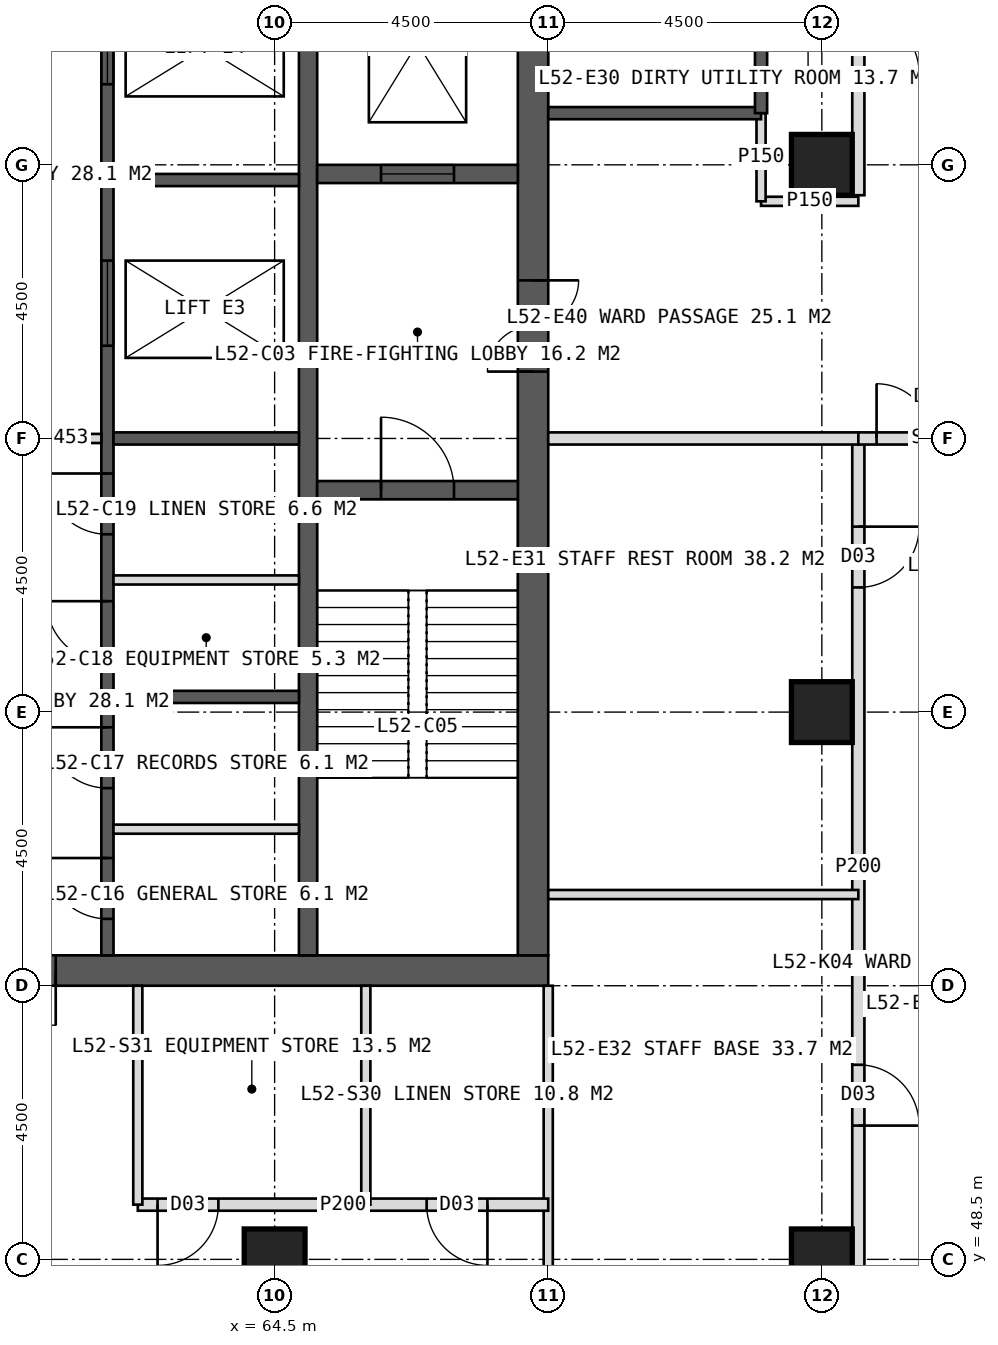
"""IFC4 building model, lengths in metres.
Left out: names, types, materials, properties, quantities, classifications, styles, units other than length and angle.
Written with IfcOpenShell. Run it as: python <this file> out.ifc"""

import sys

from ifc_helpers import new_model, si_unit, direction, frame, frame_2d, origin, origin_2d, place, context, subcontext, project, spatial, rectangle, hollow_rectangle, extrude, element, fill, save


model = new_model("IFC4")
c1 = context("Model", 3, precision=1e-05, world=origin(), true_north=direction((0.0, 1.0)))
c2 = subcontext(c1, "Body", "Model", "MODEL_VIEW")
j1 = project(units=[si_unit("LENGTHUNIT", "METRE"), si_unit("PLANEANGLEUNIT", "RADIAN")], contexts=[c1])
p1 = place(None, origin())
s1 = spatial("IfcSite", under=j1, at=p1, CompositionType="ELEMENT")
p2 = place(p1, origin())
s2 = spatial("IfcBuilding", under=s1, at=p2, CompositionType="ELEMENT")
p3 = place(p2, frame((0.0, 0.0, 217.0)))
s3 = spatial("IfcBuildingStorey", under=s2, at=p3, CompositionType="ELEMENT", Elevation=217.0)
p4 = place(p3, frame((51.0, 53.25, 0.0), z_axis=(0.0, 0.0, 1.0), x_axis=(1.0, 0.0, 0.0)))
e1 = element("IfcWall", 1, at=p4, inside=s3, PredefinedType="SHEAR", context=c2, shape_type="SweptSolid", body=[
    extrude(rectangle(XDim=18.0, YDim=0.5, at=frame_2d((9.0, 0.0))), origin(), (0.0, 0.0, 1.0), 4.0),
])
p5 = place(p4, frame((8.1, 0.0, 0.0)))
e2 = element("IfcOpeningElement", 2, at=p5, cuts=e1, PredefinedType="OPENING", context=c2, shape_type="SweptSolid", body=[
    extrude(rectangle(XDim=1.8, YDim=2.2, at=frame_2d((0.9, 1.1))), frame((0.0, 0.26, 0.0), z_axis=(0.0, -1.0, 0.0), x_axis=(1.0, 0.0, 0.0)), (0.0, 0.0, 1.0), 0.52),
])
p6 = place(p3, frame((68.75, 53.5, 0.0), z_axis=(0.0, 0.0, 1.0), x_axis=(0.0, 1.0, 0.0)))
e3 = element("IfcWall", 3, at=p6, inside=s3, PredefinedType="SHEAR", context=c2, shape_type="SweptSolid", body=[
    extrude(rectangle(XDim=17.0, YDim=0.5, at=frame_2d((8.5, 0.0))), origin(), (0.0, 0.0, 1.0), 4.0),
])
p7 = place(p6, frame((9.6, 0.0, 0.0)))
e4 = element("IfcOpeningElement", 4, at=p7, cuts=e3, PredefinedType="OPENING", context=c2, shape_type="SweptSolid", body=[
    extrude(rectangle(XDim=1.5, YDim=2.2, at=frame_2d((0.75, 1.1))), frame((0.0, 0.26, 0.0), z_axis=(0.0, -1.0, 0.0), x_axis=(1.0, 0.0, 0.0)), (0.0, 0.0, 1.0), 0.52),
])
p8 = place(p3, frame((65.05, 53.5, 0.0), z_axis=(0.0, 0.0, 1.0), x_axis=(0.0, 1.0, 0.0)))
e5 = element("IfcWall", 5, at=p8, inside=s3, PredefinedType="SHEAR", context=c2, shape_type="SweptSolid", body=[
    extrude(rectangle(XDim=17.0, YDim=0.3, at=frame_2d((8.5, 0.0))), origin(), (0.0, 0.0, 1.0), 4.0),
])
p9 = place(p3, frame((61.75, 53.5, 0.0), z_axis=(0.0, 0.0, 1.0), x_axis=(0.0, 1.0, 0.0)))
e6 = element("IfcWall", 6, at=p9, inside=s3, PredefinedType="SHEAR", context=c2, shape_type="SweptSolid", body=[
    extrude(rectangle(XDim=17.0, YDim=0.2, at=frame_2d((8.5, 0.0))), origin(), (0.0, 0.0, 1.0), 4.0),
])
p10 = place(p9, frame((0.6, 0.0, 0.0)))
e7 = element("IfcOpeningElement", 7, at=p10, cuts=e6, PredefinedType="OPENING", context=c2, shape_type="SweptSolid", body=[
    extrude(rectangle(XDim=1.0, YDim=2.1, at=frame_2d((0.5, 1.05))), frame((0.0, 0.11, 0.0), z_axis=(0.0, -1.0, 0.0), x_axis=(1.0, 0.0, 0.0)), (0.0, 0.0, 1.0), 0.22),
])
p11 = place(p9, frame((2.75, 0.0, 0.0)))
e8 = element("IfcOpeningElement", 8, at=p11, cuts=e6, PredefinedType="OPENING", context=c2, shape_type="SweptSolid", body=[
    extrude(rectangle(XDim=1.0, YDim=2.1, at=frame_2d((0.5, 1.05))), frame((0.0, 0.11, 0.0), z_axis=(0.0, -1.0, 0.0), x_axis=(1.0, 0.0, 0.0)), (0.0, 0.0, 1.0), 0.22),
])
p12 = place(p9, frame((4.824, 0.0, 0.0)))
e9 = element("IfcOpeningElement", 9, at=p12, cuts=e6, PredefinedType="OPENING", context=c2, shape_type="SweptSolid", body=[
    extrude(rectangle(XDim=1.0, YDim=2.1, at=frame_2d((0.5, 1.05))), frame((0.0, 0.11, 0.0), z_axis=(0.0, -1.0, 0.0), x_axis=(1.0, 0.0, 0.0)), (0.0, 0.0, 1.0), 0.22),
])
p13 = place(p9, frame((6.924, 0.0, 0.0)))
e10 = element("IfcOpeningElement", 10, at=p13, cuts=e6, PredefinedType="OPENING", context=c2, shape_type="SweptSolid", body=[
    extrude(rectangle(XDim=1.0, YDim=2.1, at=frame_2d((0.5, 1.05))), frame((0.0, 0.11, 0.0), z_axis=(0.0, -1.0, 0.0), x_axis=(1.0, 0.0, 0.0)), (0.0, 0.0, 1.0), 0.22),
])
p14 = place(p9, frame((10.025, 0.0, 0.0)))
e11 = element("IfcOpeningElement", 11, at=p14, cuts=e6, PredefinedType="OPENING", context=c2, shape_type="SweptSolid", body=[
    extrude(rectangle(XDim=1.4, YDim=2.2, at=frame_2d((0.7, 1.1))), frame((0.0, 0.11, 0.0), z_axis=(0.0, -1.0, 0.0), x_axis=(1.0, 0.0, 0.0)), (0.0, 0.0, 1.0), 0.22),
])
p15 = place(p9, frame((14.325, 0.0, 0.0)))
e12 = element("IfcOpeningElement", 12, at=p15, cuts=e6, PredefinedType="OPENING", context=c2, shape_type="SweptSolid", body=[
    extrude(rectangle(XDim=1.4, YDim=2.2, at=frame_2d((0.7, 1.1))), frame((0.0, 0.11, 0.0), z_axis=(0.0, -1.0, 0.0), x_axis=(1.0, 0.0, 0.0)), (0.0, 0.0, 1.0), 0.22),
])
for number, where, z_axis, x_axis in (
    (13, (61.85, 57.75, 0.0), (0.0, 0.0, 1.0), (1.0, 0.0, 0.0)),
    (14, (61.85, 62.0, 0.0), (0.0, 0.0, 1.0), (1.0, 0.0, 0.0)),
    (15, (61.85, 66.25, 0.0), (0.0, 0.0, 1.0), (1.0, 0.0, 0.0)),
):
    element("IfcWall", number, at=place(p3, frame(where, z_axis=z_axis, x_axis=x_axis)), inside=s3, PredefinedType="SHEAR", context=c2, shape_type="SweptSolid", body=[
        extrude(rectangle(XDim=3.05, YDim=0.2, at=frame_2d((1.525, 0.0))), origin(), (0.0, 0.0, 1.0), 4.0),
    ])
p16 = place(p3, frame((65.2, 61.15, 0.0), z_axis=(0.0, 0.0, 1.0), x_axis=(1.0, 0.0, 0.0)))
e16 = element("IfcWall", 16, at=p16, inside=s3, PredefinedType="SHEAR", context=c2, shape_type="SweptSolid", body=[
    extrude(rectangle(XDim=3.3, YDim=0.3, at=frame_2d((1.65, 0.0))), origin(), (0.0, 0.0, 1.0), 4.0),
])
p17 = place(p16, frame((1.05, 0.0, 0.0)))
e17 = element("IfcOpeningElement", 17, at=p17, cuts=e16, PredefinedType="OPENING", context=c2, shape_type="SweptSolid", body=[
    extrude(rectangle(XDim=1.2, YDim=2.1, at=frame_2d((0.6, 1.05))), frame((0.0, 0.16, 0.0), z_axis=(0.0, -1.0, 0.0), x_axis=(1.0, 0.0, 0.0)), (0.0, 0.0, 1.0), 0.32),
])
p18 = place(p3, frame((65.2, 66.35, 0.0), z_axis=(0.0, 0.0, 1.0), x_axis=(1.0, 0.0, 0.0)))
e18 = element("IfcWall", 18, at=p18, inside=s3, PredefinedType="SHEAR", context=c2, shape_type="SweptSolid", body=[
    extrude(rectangle(XDim=3.3, YDim=0.3, at=frame_2d((1.65, 0.0))), origin(), (0.0, 0.0, 1.0), 4.0),
])
p19 = place(p18, frame((1.05, 0.0, 0.0)))
e19 = element("IfcOpeningElement", 19, at=p19, cuts=e18, PredefinedType="OPENING", context=c2, shape_type="SweptSolid", body=[
    extrude(rectangle(XDim=1.2, YDim=2.2, at=frame_2d((0.6, 1.1))), frame((0.0, 0.16, 0.0), z_axis=(0.0, -1.0, 0.0), x_axis=(1.0, 0.0, 0.0)), (0.0, 0.0, 1.0), 0.32),
])
for number, where, z_axis, x_axis in (
    (20, (73.5, 48.5, 0.0), (0.0, 0.0, 1.0), (1.0, 0.0, 0.0)),
    (21, (64.5, 48.5, 0.0), (0.0, 0.0, 1.0), (1.0, 0.0, 0.0)),
    (22, (73.5, 57.5, 0.0), (0.0, 0.0, 1.0), (1.0, 0.0, 0.0)),
    (23, (73.5, 66.5, 0.0), (0.0, 0.0, 1.0), (1.0, 0.0, 0.0)),
):
    element("IfcColumn", number, at=place(p3, frame(where, z_axis=z_axis, x_axis=x_axis)), inside=s3, PredefinedType="COLUMN", context=c2, shape_type="SweptSolid", body=[
        extrude(hollow_rectangle(XDim=1.0, YDim=1.0, WallThickness=0.1, at=origin_2d()), origin(), (0.0, 0.0, 1.0), 4.0),
    ])
p20 = place(p3, frame((69.0, 53.0, 0.0), z_axis=(0.0, 0.0, 1.0), x_axis=(0.0, -1.0, 0.0)))
e24 = element("IfcWall", 24, at=p20, inside=s3, PredefinedType="PARTITIONING", context=c2, shape_type="SweptSolid", body=[
    extrude(rectangle(XDim=5.1, YDim=0.15, at=frame_2d((2.55, 0.0))), origin(), (0.0, 0.0, 1.0), 3.75),
])
p21 = place(p3, frame((69.0, 49.4, 0.0), z_axis=(0.0, 0.0, 1.0), x_axis=(-1.0, 0.0, 0.0)))
e25 = element("IfcWall", 25, at=p21, inside=s3, PredefinedType="PARTITIONING", context=c2, shape_type="SweptSolid", body=[
    extrude(rectangle(XDim=6.75, YDim=0.2, at=frame_2d((3.375, 0.0))), origin(), (0.0, 0.0, 1.0), 3.75),
])
p22 = place(p21, frame((1.0, 0.0, 0.0)))
e26 = element("IfcOpeningElement", 26, at=p22, cuts=e25, PredefinedType="OPENING", context=c2, shape_type="SweptSolid", body=[
    extrude(rectangle(XDim=1.0, YDim=2.1, at=frame_2d((0.5, 1.05))), frame((0.0, 0.11, 0.0), z_axis=(0.0, -1.0, 0.0), x_axis=(1.0, 0.0, 0.0)), (0.0, 0.0, 1.0), 0.22),
])
p23 = place(p21, frame((5.425, 0.0, 0.0)))
e27 = element("IfcOpeningElement", 27, at=p23, cuts=e25, PredefinedType="OPENING", context=c2, shape_type="SweptSolid", body=[
    extrude(rectangle(XDim=1.0, YDim=2.1, at=frame_2d((0.5, 1.05))), frame((0.0, 0.11, 0.0), z_axis=(0.0, -1.0, 0.0), x_axis=(1.0, 0.0, 0.0)), (0.0, 0.0, 1.0), 0.22),
])
for number, where, z_axis, x_axis in (
    (28, (62.25, 53.0, 0.0), (0.0, 0.0, 1.0), (0.0, -1.0, 0.0)),
    (29, (66.0, 53.0, 0.0), (0.0, 0.0, 1.0), (0.0, -1.0, 0.0)),
):
    element("IfcWall", number, at=place(p3, frame(where, z_axis=z_axis, x_axis=x_axis)), inside=s3, PredefinedType="PARTITIONING", context=c2, shape_type="SweptSolid", body=[
        extrude(rectangle(XDim=3.6, YDim=0.15, at=frame_2d((1.8, 0.0))), origin(), (0.0, 0.0, 1.0), 3.75),
    ])
p24 = place(p3, frame((74.1, 74.6, 0.0), z_axis=(0.0, 0.0, 1.0), x_axis=(0.0, -1.0, 0.0)))
e30 = element("IfcWall", 30, at=p24, inside=s3, PredefinedType="PARTITIONING", context=c2, shape_type="SweptSolid", body=[
    extrude(rectangle(XDim=8.6, YDim=0.2, at=frame_2d((4.3, 0.0))), origin(), (0.0, 0.0, 1.0), 3.75),
])
p25 = place(p24, frame((5.6, 0.0, 0.0)))
e31 = element("IfcOpeningElement", 31, at=p25, cuts=e30, PredefinedType="OPENING", context=c2, shape_type="SweptSolid", body=[
    extrude(rectangle(XDim=1.0, YDim=2.1, at=frame_2d((0.5, 1.05))), frame((0.0, 0.11, 0.0), z_axis=(0.0, -1.0, 0.0), x_axis=(1.0, 0.0, 0.0)), (0.0, 0.0, 1.0), 0.22),
])
p26 = place(p3, frame((74.1, 62.0, 0.0), z_axis=(0.0, 0.0, 1.0), x_axis=(0.0, -1.0, 0.0)))
e32 = element("IfcWall", 32, at=p26, inside=s3, PredefinedType="PARTITIONING", context=c2, shape_type="SweptSolid", body=[
    extrude(rectangle(XDim=14.1, YDim=0.2, at=frame_2d((7.05, 0.0))), origin(), (0.0, 0.0, 1.0), 3.75),
])
p27 = place(p26, frame((1.45, 0.0, 0.0)))
e33 = element("IfcOpeningElement", 33, at=p27, cuts=e32, PredefinedType="OPENING", context=c2, shape_type="SweptSolid", body=[
    extrude(rectangle(XDim=1.0, YDim=2.1, at=frame_2d((0.5, 1.05))), frame((0.0, 0.11, 0.0), z_axis=(0.0, -1.0, 0.0), x_axis=(1.0, 0.0, 0.0)), (0.0, 0.0, 1.0), 0.22),
])
p28 = place(p26, frame((10.3, 0.0, 0.0)))
e34 = element("IfcOpeningElement", 34, at=p28, cuts=e32, PredefinedType="OPENING", context=c2, shape_type="SweptSolid", body=[
    extrude(rectangle(XDim=1.0, YDim=2.1, at=frame_2d((0.5, 1.05))), frame((0.0, 0.11, 0.0), z_axis=(0.0, -1.0, 0.0), x_axis=(1.0, 0.0, 0.0)), (0.0, 0.0, 1.0), 0.22),
])
p29 = place(p3, frame((72.5, 65.9, 0.0), z_axis=(0.0, 0.0, 1.0), x_axis=(1.0, 0.0, 0.0)))
e35 = element("IfcWall", 35, at=p29, inside=s3, PredefinedType="PARTITIONING", context=c2, shape_type="SweptSolid", body=[
    extrude(rectangle(XDim=1.6, YDim=0.15, at=frame_2d((0.8, 0.0))), origin(), (0.0, 0.0, 1.0), 3.75),
])
p30 = place(p3, frame((69.0, 62.0, 0.0), z_axis=(0.0, 0.0, 1.0), x_axis=(1.0, 0.0, 0.0)))
e36 = element("IfcWall", 36, at=p30, inside=s3, PredefinedType="SOLIDWALL", context=c2, shape_type="SweptSolid", body=[
    extrude(rectangle(XDim=5.1, YDim=0.2, at=frame_2d((2.55, 0.0))), origin(), (0.0, 0.0, 1.0), 2.95),
])
p31 = place(p3, frame((69.0, 54.5, 0.0), z_axis=(0.0, 0.0, 1.0), x_axis=(1.0, 0.0, 0.0)))
e37 = element("IfcWall", 37, at=p31, inside=s3, PredefinedType="PARTITIONING", context=c2, shape_type="SweptSolid", body=[
    extrude(rectangle(XDim=5.1, YDim=0.15, at=frame_2d((2.55, 0.0))), origin(), (0.0, 0.0, 1.0), 3.75),
])
p32 = place(p3, frame((74.1, 62.0, 0.0), z_axis=(0.0, 0.0, 1.0), x_axis=(1.0, 0.0, 0.0)))
e38 = element("IfcWall", 38, at=p32, inside=s3, PredefinedType="SOLIDWALL", context=c2, shape_type="SweptSolid", body=[
    extrude(rectangle(XDim=2.7, YDim=0.2, at=frame_2d((1.35, 0.0))), origin(), (0.0, 0.0, 1.0), 2.95),
])
p33 = place(p32, frame((0.3, 0.0, 0.0)))
e39 = element("IfcOpeningElement", 39, at=p33, cuts=e38, PredefinedType="OPENING", context=c2, shape_type="SweptSolid", body=[
    extrude(rectangle(XDim=1.8, YDim=2.2, at=frame_2d((0.9, 1.1))), frame((0.0, 0.11, 0.0), z_axis=(0.0, -1.0, 0.0), x_axis=(1.0, 0.0, 0.0)), (0.0, 0.0, 1.0), 0.22),
])
for number, where, z_axis, x_axis in (
    (40, (61.85, 55.575, 0.0), (0.0, 0.0, 1.0), (1.0, 0.0, 0.0)),
    (41, (61.85, 59.673, 0.0), (0.0, 0.0, 1.0), (1.0, 0.0, 0.0)),
):
    element("IfcWall", number, at=place(p3, frame(where, z_axis=z_axis, x_axis=x_axis)), inside=s3, PredefinedType="PARTITIONING", context=c2, shape_type="SweptSolid", body=[
        extrude(rectangle(XDim=3.05, YDim=0.15, at=frame_2d((1.525, 0.0))), origin(), (0.0, 0.0, 1.0), 3.75),
    ])
p34 = place(p3, frame((58.35, 62.0, 0.0), z_axis=(0.0, 0.0, 1.0), x_axis=(1.0, 0.0, 0.0)))
e42 = element("IfcWall", 42, at=p34, inside=s3, PredefinedType="PARTITIONING", context=c2, shape_type="SweptSolid", body=[
    extrude(rectangle(XDim=3.3, YDim=0.15, at=frame_2d((1.65, 0.0))), origin(), (0.0, 0.0, 1.0), 3.75),
])
p35 = place(p3, frame((72.5, 65.9, 0.0), z_axis=(0.0, 0.0, 1.0), x_axis=(0.0, 1.0, 0.0)))
e43 = element("IfcWall", 43, at=p35, inside=s3, PredefinedType="PARTITIONING", context=c2, shape_type="SweptSolid", body=[
    extrude(rectangle(XDim=1.45, YDim=0.15, at=frame_2d((0.725, 0.0))), origin(), (0.0, 0.0, 1.0), 3.75),
])
p36 = place(p3, frame((69.0, 67.35, 0.0), z_axis=(0.0, 0.0, 1.0), x_axis=(1.0, 0.0, 0.0)))
e44 = element("IfcWall", 44, at=p36, inside=s3, PredefinedType="SOLIDWALL", context=c2, shape_type="SweptSolid", body=[
    extrude(rectangle(XDim=3.5, YDim=0.2, at=frame_2d((1.75, 0.0))), origin(), (0.0, 0.0, 1.0), 3.75),
])
p37 = place(p3, frame((72.5, 67.35, 0.0), z_axis=(0.0, 0.0, 1.0), x_axis=(0.0, 1.0, 0.0)))
e45 = element("IfcWall", 45, at=p37, inside=s3, PredefinedType="SOLIDWALL", context=c2, shape_type="SweptSolid", body=[
    extrude(rectangle(XDim=7.75, YDim=0.2, at=frame_2d((3.875, 0.0))), origin(), (0.0, 0.0, 1.0), 3.75),
])
p38 = place(p22, origin())
e46 = element("IfcDoor", 46, at=p38, inside=s3, OperationType="SINGLE_SWING_LEFT", PredefinedType="DOOR", context=c2, shape_type="SweptSolid", body=[
    extrude(rectangle(XDim=1.0, YDim=2.1, at=frame_2d((0.5, 1.05))), frame((0.0, 0.025, 0.0), z_axis=(0.0, -1.0, 0.0), x_axis=(1.0, 0.0, 0.0)), (0.0, 0.0, 1.0), 0.05),
])
fill(e26, e46)
p39 = place(p23, origin())
e47 = element("IfcDoor", 47, at=p39, inside=s3, OperationType="SINGLE_SWING_RIGHT", PredefinedType="DOOR", context=c2, shape_type="SweptSolid", body=[
    extrude(rectangle(XDim=1.0, YDim=2.1, at=frame_2d((0.5, 1.05))), frame((0.0, 0.025, 0.0), z_axis=(0.0, -1.0, 0.0), x_axis=(1.0, 0.0, 0.0)), (0.0, 0.0, 1.0), 0.05),
])
fill(e27, e47)
p40 = place(p25, origin())
e48 = element("IfcDoor", 48, at=p40, inside=s3, OperationType="SINGLE_SWING_RIGHT", PredefinedType="DOOR", context=c2, shape_type="SweptSolid", body=[
    extrude(rectangle(XDim=1.0, YDim=2.1, at=frame_2d((0.5, 1.05))), frame((0.0, 0.025, 0.0), z_axis=(0.0, -1.0, 0.0), x_axis=(1.0, 0.0, 0.0)), (0.0, 0.0, 1.0), 0.05),
])
fill(e31, e48)
p41 = place(p27, origin())
e49 = element("IfcDoor", 49, at=p41, inside=s3, OperationType="SINGLE_SWING_LEFT", PredefinedType="DOOR", context=c2, shape_type="SweptSolid", body=[
    extrude(rectangle(XDim=1.0, YDim=2.1, at=frame_2d((0.5, 1.05))), frame((0.0, 0.025, 0.0), z_axis=(0.0, -1.0, 0.0), x_axis=(1.0, 0.0, 0.0)), (0.0, 0.0, 1.0), 0.05),
])
fill(e33, e49)
p42 = place(p28, origin())
e50 = element("IfcDoor", 50, at=p42, inside=s3, OperationType="SINGLE_SWING_RIGHT", PredefinedType="DOOR", context=c2, shape_type="SweptSolid", body=[
    extrude(rectangle(XDim=1.0, YDim=2.1, at=frame_2d((0.5, 1.05))), frame((0.0, 0.025, 0.0), z_axis=(0.0, -1.0, 0.0), x_axis=(1.0, 0.0, 0.0)), (0.0, 0.0, 1.0), 0.05),
])
fill(e34, e50)
p43 = place(p33, origin())
e51 = element("IfcDoor", 51, at=p43, inside=s3, OperationType="DOUBLE_DOOR_DOUBLE_SWING", PredefinedType="DOOR", context=c2, shape_type="SweptSolid", body=[
    extrude(rectangle(XDim=1.8, YDim=2.2, at=frame_2d((0.9, 1.1))), frame((0.0, 0.025, 0.0), z_axis=(0.0, -1.0, 0.0), x_axis=(1.0, 0.0, 0.0)), (0.0, 0.0, 1.0), 0.05),
])
fill(e39, e51)
p44 = place(p7, origin())
e52 = element("IfcDoor", 52, at=p44, inside=s3, OperationType="DOUBLE_DOOR_SINGLE_SWING", PredefinedType="DOOR", context=c2, shape_type="SweptSolid", body=[
    extrude(rectangle(XDim=1.5, YDim=2.2, at=frame_2d((0.75, 1.1))), frame((0.0, 0.025, 0.0), z_axis=(0.0, -1.0, 0.0), x_axis=(1.0, 0.0, 0.0)), (0.0, 0.0, 1.0), 0.05),
])
fill(e4, e52)
p45 = place(p17, origin())
e53 = element("IfcDoor", 53, at=p45, inside=s3, OperationType="SINGLE_SWING_LEFT", PredefinedType="DOOR", context=c2, shape_type="SweptSolid", body=[
    extrude(rectangle(XDim=1.2, YDim=2.1, at=frame_2d((0.6, 1.05))), frame((0.0, 0.025, 0.0), z_axis=(0.0, -1.0, 0.0), x_axis=(1.0, 0.0, 0.0)), (0.0, 0.0, 1.0), 0.05),
])
fill(e17, e53)
p46 = place(p19, origin())
e54 = element("IfcDoor", 54, at=p46, inside=s3, OperationType="SLIDING_TO_LEFT", PredefinedType="DOOR", context=c2, shape_type="SweptSolid", body=[
    extrude(rectangle(XDim=1.2, YDim=2.2, at=frame_2d((0.6, 1.1))), frame((0.0, 0.025, 0.0), z_axis=(0.0, -1.0, 0.0), x_axis=(1.0, 0.0, 0.0)), (0.0, 0.0, 1.0), 0.05),
])
fill(e19, e54)
p47 = place(p10, origin())
e55 = element("IfcDoor", 55, at=p47, inside=s3, OperationType="SINGLE_SWING_RIGHT", PredefinedType="DOOR", context=c2, shape_type="SweptSolid", body=[
    extrude(rectangle(XDim=1.0, YDim=2.1, at=frame_2d((0.5, 1.05))), frame((0.0, 0.025, 0.0), z_axis=(0.0, -1.0, 0.0), x_axis=(1.0, 0.0, 0.0)), (0.0, 0.0, 1.0), 0.05),
])
fill(e7, e55)
p48 = place(p11, origin())
e56 = element("IfcDoor", 56, at=p48, inside=s3, OperationType="SINGLE_SWING_RIGHT", PredefinedType="DOOR", context=c2, shape_type="SweptSolid", body=[
    extrude(rectangle(XDim=1.0, YDim=2.1, at=frame_2d((0.5, 1.05))), frame((0.0, 0.025, 0.0), z_axis=(0.0, -1.0, 0.0), x_axis=(1.0, 0.0, 0.0)), (0.0, 0.0, 1.0), 0.05),
])
fill(e8, e56)
p49 = place(p12, origin())
e57 = element("IfcDoor", 57, at=p49, inside=s3, OperationType="SINGLE_SWING_RIGHT", PredefinedType="DOOR", context=c2, shape_type="SweptSolid", body=[
    extrude(rectangle(XDim=1.0, YDim=2.1, at=frame_2d((0.5, 1.05))), frame((0.0, 0.025, 0.0), z_axis=(0.0, -1.0, 0.0), x_axis=(1.0, 0.0, 0.0)), (0.0, 0.0, 1.0), 0.05),
])
fill(e9, e57)
p50 = place(p13, origin())
e58 = element("IfcDoor", 58, at=p50, inside=s3, OperationType="SINGLE_SWING_RIGHT", PredefinedType="DOOR", context=c2, shape_type="SweptSolid", body=[
    extrude(rectangle(XDim=1.0, YDim=2.1, at=frame_2d((0.5, 1.05))), frame((0.0, 0.025, 0.0), z_axis=(0.0, -1.0, 0.0), x_axis=(1.0, 0.0, 0.0)), (0.0, 0.0, 1.0), 0.05),
])
fill(e10, e58)
p51 = place(p14, origin())
e59 = element("IfcDoor", 59, at=p51, inside=s3, OperationType="SLIDING_TO_LEFT", PredefinedType="DOOR", context=c2, shape_type="SweptSolid", body=[
    extrude(rectangle(XDim=1.4, YDim=2.2, at=frame_2d((0.7, 1.1))), frame((0.0, 0.025, 0.0), z_axis=(0.0, -1.0, 0.0), x_axis=(1.0, 0.0, 0.0)), (0.0, 0.0, 1.0), 0.05),
])
fill(e11, e59)
p52 = place(p15, origin())
e60 = element("IfcDoor", 60, at=p52, inside=s3, OperationType="SLIDING_TO_LEFT", PredefinedType="DOOR", context=c2, shape_type="SweptSolid", body=[
    extrude(rectangle(XDim=1.4, YDim=2.2, at=frame_2d((0.7, 1.1))), frame((0.0, 0.025, 0.0), z_axis=(0.0, -1.0, 0.0), x_axis=(1.0, 0.0, 0.0)), (0.0, 0.0, 1.0), 0.05),
])
fill(e12, e60)
p53 = place(p5, origin())
e61 = element("IfcDoor", 61, at=p53, inside=s3, OperationType="DOUBLE_DOOR_SINGLE_SWING", PredefinedType="DOOR", context=c2, shape_type="SweptSolid", body=[
    extrude(rectangle(XDim=1.8, YDim=2.2, at=frame_2d((0.9, 1.1))), frame((0.0, 0.025, 0.0), z_axis=(0.0, -1.0, 0.0), x_axis=(1.0, 0.0, 0.0)), (0.0, 0.0, 1.0), 0.05),
])
fill(e2, e61)
save(model, sys.argv[1])
